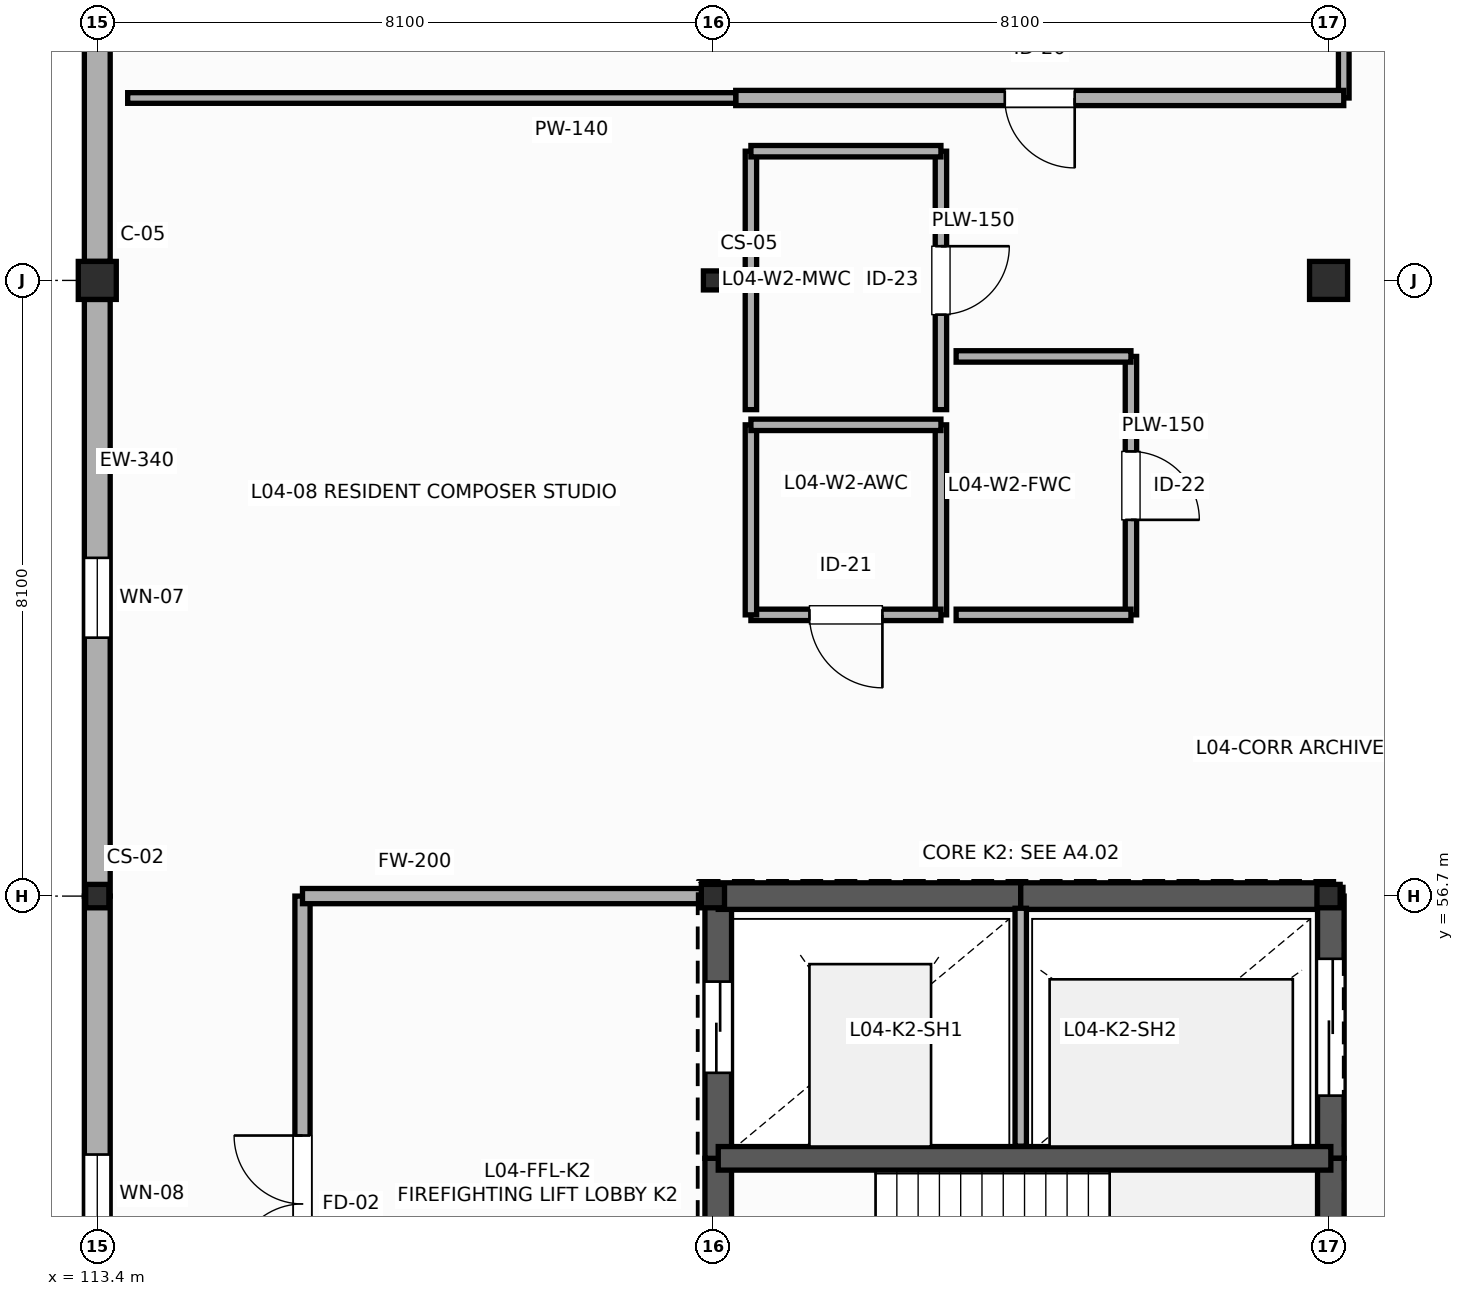
"""IFC4 building model, lengths in metres.
Left out: names, types, materials, properties, quantities, classifications, styles, units other than length and angle.
Written with IfcOpenShell. Run it as: python <this file> out.ifc"""

import sys

from ifc_helpers import new_model, si_unit, direction, frame, frame_2d, origin, origin_2d, place, context, subcontext, project, spatial, rectangle, hollow_rectangle, i_section, extrude, element, fill, save


model = new_model("IFC4")
c1 = context("Model", 3, precision=1e-05, world=origin(), true_north=direction((0.0, 1.0)))
c2 = subcontext(c1, "Body", "Model", "MODEL_VIEW")
j1 = project(units=[si_unit("LENGTHUNIT", "METRE"), si_unit("PLANEANGLEUNIT", "RADIAN")], contexts=[c1])
p1 = place(None, origin())
s1 = spatial("IfcSite", under=j1, at=p1, CompositionType="ELEMENT")
p2 = place(p1, origin())
s2 = spatial("IfcBuilding", under=s1, at=p2, CompositionType="ELEMENT")
p3 = place(p2, frame((0.0, 0.0, 19.2)))
s3 = spatial("IfcBuildingStorey", under=s2, at=p3, CompositionType="ELEMENT", Elevation=19.2)
p4 = place(p3, frame((113.4, 56.7, 0.0), z_axis=(0.0, 0.0, 1.0), x_axis=(1.0, 0.0, 0.0)))
e1 = element("IfcColumn", 1, at=p4, inside=s3, PredefinedType="COLUMN", context=c2, shape_type="SweptSolid", body=[
    extrude(i_section(OverallWidth=0.305, OverallDepth=0.308, WebThickness=0.01, FlangeThickness=0.015, FilletRadius=0.015, at=origin_2d()), origin(), (0.0, 0.0, 1.0), 4.2),
])
p5 = place(p3, frame((113.4, 64.8, 0.0), z_axis=(0.0, 0.0, 1.0), x_axis=(1.0, 0.0, 0.0)))
e2 = element("IfcColumn", 2, at=p5, inside=s3, PredefinedType="COLUMN", context=c2, shape_type="SweptSolid", body=[
    extrude(rectangle(XDim=0.5, YDim=0.5, at=origin_2d()), origin(), (0.0, 0.0, 1.0), 4.2),
])
p6 = place(p3, frame((121.5, 56.7, 0.0), z_axis=(0.0, 0.0, 1.0), x_axis=(1.0, 0.0, 0.0)))
e3 = element("IfcColumn", 3, at=p6, inside=s3, PredefinedType="COLUMN", context=c2, shape_type="SweptSolid", body=[
    extrude(i_section(OverallWidth=0.305, OverallDepth=0.308, WebThickness=0.01, FlangeThickness=0.015, FilletRadius=0.015, at=origin_2d()), origin(), (0.0, 0.0, 1.0), 4.2),
])
p7 = place(p3, frame((121.5, 64.8, 0.0), z_axis=(0.0, 0.0, 1.0), x_axis=(1.0, 0.0, 0.0)))
e4 = element("IfcColumn", 4, at=p7, inside=s3, PredefinedType="COLUMN", context=c2, shape_type="SweptSolid", body=[
    extrude(hollow_rectangle(XDim=0.25, YDim=0.25, WallThickness=0.012, InnerFilletRadius=0.012, OuterFilletRadius=0.025, at=origin_2d()), origin(), (0.0, 0.0, 1.0), 4.2),
])
p8 = place(p3, frame((129.6, 56.7, 0.0), z_axis=(0.0, 0.0, 1.0), x_axis=(1.0, 0.0, 0.0)))
e5 = element("IfcColumn", 5, at=p8, inside=s3, PredefinedType="COLUMN", context=c2, shape_type="SweptSolid", body=[
    extrude(i_section(OverallWidth=0.305, OverallDepth=0.308, WebThickness=0.01, FlangeThickness=0.015, FilletRadius=0.015, at=origin_2d()), origin(), (0.0, 0.0, 1.0), 4.2),
])
p9 = place(p3, frame((129.6, 64.8, 0.0), z_axis=(0.0, 0.0, 1.0), x_axis=(1.0, 0.0, 0.0)))
e6 = element("IfcColumn", 6, at=p9, inside=s3, PredefinedType="COLUMN", context=c2, shape_type="SweptSolid", body=[
    extrude(rectangle(XDim=0.5, YDim=0.5, at=origin_2d()), origin(), (0.0, 0.0, 1.0), 4.2),
])
p10 = place(p3, frame((113.4, 72.65, 0.0), z_axis=(0.0, 0.0, 1.0), x_axis=(0.0, -1.0, 0.0)))
e7 = element("IfcWall", 7, at=p10, inside=s3, PredefinedType="SOLIDWALL", context=c2, shape_type="SweptSolid", body=[
    extrude(rectangle(XDim=7.6, YDim=0.34, at=frame_2d((3.8, 0.0))), origin(), (0.0, 0.0, 1.0), 3.597),
])
p11 = place(p10, frame((3.325, 0.0, 0.9)))
e8 = element("IfcOpeningElement", 8, at=p11, cuts=e7, PredefinedType="OPENING", context=c2, shape_type="SweptSolid", body=[
    extrude(rectangle(XDim=0.95, YDim=1.85, at=frame_2d((0.475, 0.925))), frame((0.0, 0.18, 0.0), z_axis=(0.0, -1.0, 0.0), x_axis=(1.0, 0.0, 0.0)), (0.0, 0.0, 1.0), 0.36),
])
p12 = place(p3, frame((113.4, 64.55, 0.0), z_axis=(0.0, 0.0, 1.0), x_axis=(0.0, -1.0, 0.0)))
e9 = element("IfcWall", 9, at=p12, inside=s3, PredefinedType="SOLIDWALL", context=c2, shape_type="SweptSolid", body=[
    extrude(rectangle(XDim=7.85, YDim=0.34, at=frame_2d((3.925, 0.0))), origin(), (0.0, 0.0, 1.0), 3.597),
])
p13 = place(p12, frame((3.4, 0.0, 0.9)))
e10 = element("IfcOpeningElement", 10, at=p13, cuts=e9, PredefinedType="OPENING", context=c2, shape_type="SweptSolid", body=[
    extrude(rectangle(XDim=1.05, YDim=1.35, at=frame_2d((0.525, 0.675))), frame((0.0, 0.18, 0.0), z_axis=(0.0, -1.0, 0.0), x_axis=(1.0, 0.0, 0.0)), (0.0, 0.0, 1.0), 0.36),
])
p14 = place(p3, frame((113.4, 56.7, 0.0), z_axis=(0.0, 0.0, 1.0), x_axis=(0.0, -1.0, 0.0)))
e11 = element("IfcWall", 11, at=p14, inside=s3, PredefinedType="SOLIDWALL", context=c2, shape_type="SweptSolid", body=[
    extrude(rectangle(XDim=7.85, YDim=0.34, at=frame_2d((3.925, 0.0))), origin(), (0.0, 0.0, 1.0), 3.597),
])
p15 = place(p14, frame((3.4, 0.0, 0.9)))
e12 = element("IfcOpeningElement", 12, at=p15, cuts=e11, PredefinedType="OPENING", context=c2, shape_type="SweptSolid", body=[
    extrude(rectangle(XDim=1.05, YDim=1.65, at=frame_2d((0.525, 0.825))), frame((0.0, 0.18, 0.0), z_axis=(0.0, -1.0, 0.0), x_axis=(1.0, 0.0, 0.0)), (0.0, 0.0, 1.0), 0.36),
])
p16 = place(p3, frame((121.57, 48.83, 0.0), z_axis=(0.0, 0.0, 1.0), x_axis=(0.0, 1.0, 0.0)))
e13 = element("IfcWall", 13, at=p16, inside=s3, PredefinedType="SHEAR", context=c2, shape_type="SweptSolid", body=[
    extrude(rectangle(XDim=4.42, YDim=0.35, at=frame_2d((2.21, 0.0))), origin(), (0.0, 0.0, 1.0), 4.2),
])
p17 = place(p16, frame((1.35, 0.0, 0.0)))
e14 = element("IfcOpeningElement", 14, at=p17, cuts=e13, PredefinedType="OPENING", context=c2, shape_type="SweptSolid", body=[
    extrude(rectangle(XDim=1.2, YDim=2.25, at=frame_2d((0.6, 1.125))), frame((0.0, 0.185, 0.0), z_axis=(0.0, -1.0, 0.0), x_axis=(1.0, 0.0, 0.0)), (0.0, 0.0, 1.0), 0.37),
])
p18 = place(p3, frame((121.57, 53.25, 0.0), z_axis=(0.0, 0.0, 1.0), x_axis=(0.0, 1.0, 0.0)))
e15 = element("IfcWall", 15, at=p18, inside=s3, PredefinedType="SHEAR", context=c2, shape_type="SweptSolid", body=[
    extrude(rectangle(XDim=3.45, YDim=0.35, at=frame_2d((1.725, 0.0))), origin(), (0.0, 0.0, 1.0), 4.2),
])
p19 = place(p18, frame((1.125, 0.0, 0.0)))
e16 = element("IfcOpeningElement", 16, at=p19, cuts=e15, PredefinedType="OPENING", context=c2, shape_type="SweptSolid", body=[
    extrude(rectangle(XDim=1.2, YDim=2.2, at=frame_2d((0.6, 1.1))), frame((0.0, 0.185, 0.0), z_axis=(0.0, -1.0, 0.0), x_axis=(1.0, 0.0, 0.0)), (0.0, 0.0, 1.0), 0.37),
])
p20 = place(p3, frame((121.57, 56.7, 0.0), z_axis=(0.0, 0.0, 1.0), x_axis=(1.0, 0.0, 0.0)))
e17 = element("IfcWall", 17, at=p20, inside=s3, PredefinedType="SHEAR", context=c2, shape_type="SweptSolid", body=[
    extrude(rectangle(XDim=3.98, YDim=0.35, at=frame_2d((1.99, 0.0))), origin(), (0.0, 0.0, 1.0), 4.2),
])
p21 = place(p3, frame((125.55, 56.7, 0.0), z_axis=(0.0, 0.0, 1.0), x_axis=(1.0, 0.0, 0.0)))
e18 = element("IfcWall", 18, at=p21, inside=s3, PredefinedType="SHEAR", context=c2, shape_type="SweptSolid", body=[
    extrude(rectangle(XDim=4.08, YDim=0.35, at=frame_2d((2.04, 0.0))), origin(), (0.0, 0.0, 1.0), 4.2),
])
p22 = place(p3, frame((129.63, 56.7, 0.0), z_axis=(0.0, 0.0, 1.0), x_axis=(0.0, -1.0, 0.0)))
e19 = element("IfcWall", 19, at=p22, inside=s3, PredefinedType="SHEAR", context=c2, shape_type="SweptSolid", body=[
    extrude(rectangle(XDim=3.45, YDim=0.35, at=frame_2d((1.725, 0.0))), origin(), (0.0, 0.0, 1.0), 4.2),
])
p23 = place(p22, frame((0.825, 0.0, 0.0)))
e20 = element("IfcOpeningElement", 20, at=p23, cuts=e19, PredefinedType="OPENING", context=c2, shape_type="SweptSolid", body=[
    extrude(rectangle(XDim=1.8, YDim=2.4, at=frame_2d((0.9, 1.2))), frame((0.0, 0.185, 0.0), z_axis=(0.0, -1.0, 0.0), x_axis=(1.0, 0.0, 0.0)), (0.0, 0.0, 1.0), 0.37),
])
p24 = place(p3, frame((129.63, 53.25, 0.0), z_axis=(0.0, 0.0, 1.0), x_axis=(0.0, -1.0, 0.0)))
e21 = element("IfcWall", 21, at=p24, inside=s3, PredefinedType="SHEAR", context=c2, shape_type="SweptSolid", body=[
    extrude(rectangle(XDim=4.42, YDim=0.35, at=frame_2d((2.21, 0.0))), origin(), (0.0, 0.0, 1.0), 4.2),
])
p25 = place(p3, frame((121.57, 53.25, 0.0), z_axis=(0.0, 0.0, 1.0), x_axis=(1.0, 0.0, 0.0)))
e22 = element("IfcWall", 22, at=p25, inside=s3, PredefinedType="SHEAR", context=c2, shape_type="SweptSolid", body=[
    extrude(rectangle(XDim=8.06, YDim=0.31, at=frame_2d((4.03, 0.0))), origin(), (0.0, 0.0, 1.0), 4.2),
])
p26 = place(p3, frame((125.55, 53.41, 0.0), z_axis=(0.0, 0.0, 1.0), x_axis=(0.0, 1.0, 0.0)))
e23 = element("IfcWall", 23, at=p26, inside=s3, PredefinedType="PLUMBINGWALL", context=c2, shape_type="SweptSolid", body=[
    extrude(rectangle(XDim=3.13, YDim=0.15, at=frame_2d((1.565, 0.0))), origin(), (0.0, 0.0, 1.0), 3.85),
])
p27 = place(p3, frame((116.1, 48.6, 0.0), z_axis=(0.0, 0.0, 1.0), x_axis=(0.0, 1.0, 0.0)))
e24 = element("IfcWall", 24, at=p27, inside=s3, PredefinedType="PARTITIONING", context=c2, shape_type="SweptSolid", body=[
    extrude(rectangle(XDim=8.1, YDim=0.2, at=frame_2d((4.05, 0.0))), origin(), (0.0, 0.0, 1.0), 3.9),
])
p28 = place(p27, frame((3.15, 0.0, 0.0)))
e25 = element("IfcOpeningElement", 25, at=p28, cuts=e24, PredefinedType="OPENING", context=c2, shape_type="SweptSolid", body=[
    extrude(rectangle(XDim=1.8, YDim=2.25, at=frame_2d((0.9, 1.125))), frame((0.0, 0.11, 0.0), z_axis=(0.0, -1.0, 0.0), x_axis=(1.0, 0.0, 0.0)), (0.0, 0.0, 1.0), 0.22),
])
p29 = place(p3, frame((116.1, 56.7, 0.0), z_axis=(0.0, 0.0, 1.0), x_axis=(1.0, 0.0, 0.0)))
e26 = element("IfcWall", 26, at=p29, inside=s3, PredefinedType="PARTITIONING", context=c2, shape_type="SweptSolid", body=[
    extrude(rectangle(XDim=5.47, YDim=0.2, at=frame_2d((2.735, 0.0))), origin(), (0.0, 0.0, 1.0), 3.346),
])
p30 = place(p3, frame((124.5, 62.9, 0.0), z_axis=(0.0, 0.0, 1.0), x_axis=(0.0, -1.0, 0.0)))
e27 = element("IfcWall", 27, at=p30, inside=s3, PredefinedType="PLUMBINGWALL", context=c2, shape_type="SweptSolid", body=[
    extrude(rectangle(XDim=2.5, YDim=0.15, at=frame_2d((1.25, 0.0))), origin(), (0.0, 0.0, 1.0), 3.92),
])
p31 = place(p3, frame((124.5, 60.4, 0.0), z_axis=(0.0, 0.0, 1.0), x_axis=(-1.0, 0.0, 0.0)))
e28 = element("IfcWall", 28, at=p31, inside=s3, PredefinedType="PLUMBINGWALL", context=c2, shape_type="SweptSolid", body=[
    extrude(rectangle(XDim=2.5, YDim=0.15, at=frame_2d((1.25, 0.0))), origin(), (0.0, 0.0, 1.0), 3.92),
])
p32 = place(p31, frame((0.77, 0.0, 0.0)))
e29 = element("IfcOpeningElement", 29, at=p32, cuts=e28, PredefinedType="OPENING", context=c2, shape_type="SweptSolid", body=[
    extrude(rectangle(XDim=0.96, YDim=2.16, at=frame_2d((0.48, 1.08))), frame((0.0, 0.085, 0.0), z_axis=(0.0, -1.0, 0.0), x_axis=(1.0, 0.0, 0.0)), (0.0, 0.0, 1.0), 0.17),
])
for number, where, z_axis, x_axis in (
    (30, (122.0, 60.4, 0.0), (0.0, 0.0, 1.0), (0.0, 1.0, 0.0)),
    (31, (122.0, 62.9, 0.0), (0.0, 0.0, 1.0), (1.0, 0.0, 0.0)),
):
    element("IfcWall", number, at=place(p3, frame(where, z_axis=z_axis, x_axis=x_axis)), inside=s3, PredefinedType="PLUMBINGWALL", context=c2, shape_type="SweptSolid", body=[
        extrude(rectangle(XDim=2.5, YDim=0.15, at=frame_2d((1.25, 0.0))), origin(), (0.0, 0.0, 1.0), 3.92),
    ])
p33 = place(p3, frame((127.0, 63.8, 0.0), z_axis=(0.0, 0.0, 1.0), x_axis=(0.0, -1.0, 0.0)))
e32 = element("IfcWall", 32, at=p33, inside=s3, PredefinedType="PLUMBINGWALL", context=c2, shape_type="SweptSolid", body=[
    extrude(rectangle(XDim=3.4, YDim=0.15, at=frame_2d((1.7, 0.0))), origin(), (0.0, 0.0, 1.0), 3.92),
])
p34 = place(p33, frame((1.25, 0.0, 0.0)))
e33 = element("IfcOpeningElement", 33, at=p34, cuts=e32, PredefinedType="OPENING", context=c2, shape_type="SweptSolid", body=[
    extrude(rectangle(XDim=0.9, YDim=2.1, at=frame_2d((0.45, 1.05))), frame((0.0, 0.085, 0.0), z_axis=(0.0, -1.0, 0.0), x_axis=(1.0, 0.0, 0.0)), (0.0, 0.0, 1.0), 0.17),
])
for number, where, z_axis, x_axis in (
    (34, (127.0, 60.4, 0.0), (0.0, 0.0, 1.0), (-1.0, 0.0, 0.0)),
    (35, (124.7, 63.8, 0.0), (0.0, 0.0, 1.0), (1.0, 0.0, 0.0)),
):
    element("IfcWall", number, at=place(p3, frame(where, z_axis=z_axis, x_axis=x_axis)), inside=s3, PredefinedType="PLUMBINGWALL", context=c2, shape_type="SweptSolid", body=[
        extrude(rectangle(XDim=2.3, YDim=0.15, at=frame_2d((1.15, 0.0))), origin(), (0.0, 0.0, 1.0), 3.92),
    ])
p35 = place(p3, frame((124.5, 66.5, 0.0), z_axis=(0.0, 0.0, 1.0), x_axis=(0.0, -1.0, 0.0)))
e36 = element("IfcWall", 36, at=p35, inside=s3, PredefinedType="PLUMBINGWALL", context=c2, shape_type="SweptSolid", body=[
    extrude(rectangle(XDim=3.4, YDim=0.15, at=frame_2d((1.7, 0.0))), origin(), (0.0, 0.0, 1.0), 3.92),
])
p36 = place(p35, frame((1.25, 0.0, 0.0)))
e37 = element("IfcOpeningElement", 37, at=p36, cuts=e36, PredefinedType="OPENING", context=c2, shape_type="SweptSolid", body=[
    extrude(rectangle(XDim=0.9, YDim=2.2, at=frame_2d((0.45, 1.1))), frame((0.0, 0.085, 0.0), z_axis=(0.0, -1.0, 0.0), x_axis=(1.0, 0.0, 0.0)), (0.0, 0.0, 1.0), 0.17),
])
p37 = place(p3, frame((122.0, 63.1, 0.0), z_axis=(0.0, 0.0, 1.0), x_axis=(0.0, 1.0, 0.0)))
e38 = element("IfcWall", 38, at=p37, inside=s3, PredefinedType="PLUMBINGWALL", context=c2, shape_type="SweptSolid", body=[
    extrude(rectangle(XDim=3.4, YDim=0.15, at=frame_2d((1.7, 0.0))), origin(), (0.0, 0.0, 1.0), 3.92),
])
p38 = place(p3, frame((122.0, 66.5, 0.0), z_axis=(0.0, 0.0, 1.0), x_axis=(1.0, 0.0, 0.0)))
e39 = element("IfcWall", 39, at=p38, inside=s3, PredefinedType="PLUMBINGWALL", context=c2, shape_type="SweptSolid", body=[
    extrude(rectangle(XDim=2.5, YDim=0.15, at=frame_2d((1.25, 0.0))), origin(), (0.0, 0.0, 1.0), 3.92),
])
p39 = place(p3, frame((129.8, 74.367, 0.0), z_axis=(0.0, 0.0, 1.0), x_axis=(0.0, -1.0, 0.0)))
e40 = element("IfcWall", 40, at=p39, inside=s3, PredefinedType="PARTITIONING", context=c2, shape_type="SweptSolid", body=[
    extrude(rectangle(XDim=7.167, YDim=0.14, at=frame_2d((3.583, 0.0))), origin(), (0.0, 0.0, 1.0), 3.254),
])
p40 = place(p3, frame((129.8, 67.2, 0.0), z_axis=(0.0, 0.0, 1.0), x_axis=(-1.0, 0.0, 0.0)))
e41 = element("IfcWall", 41, at=p40, inside=s3, PredefinedType="PARTITIONING", context=c2, shape_type="SweptSolid", body=[
    extrude(rectangle(XDim=8.0, YDim=0.2, at=frame_2d((4.0, 0.0))), origin(), (0.0, 0.0, 1.0), 3.92),
])
p41 = place(p40, frame((3.54, 0.0, 0.0)))
e42 = element("IfcOpeningElement", 42, at=p41, cuts=e41, PredefinedType="OPENING", context=c2, shape_type="SweptSolid", body=[
    extrude(rectangle(XDim=0.92, YDim=2.1, at=frame_2d((0.46, 1.05))), frame((0.0, 0.11, 0.0), z_axis=(0.0, -1.0, 0.0), x_axis=(1.0, 0.0, 0.0)), (0.0, 0.0, 1.0), 0.22),
])
p42 = place(p3, frame((121.8, 67.2, 0.0), z_axis=(0.0, 0.0, 1.0), x_axis=(-1.0, 0.0, 0.0)))
e43 = element("IfcWall", 43, at=p42, inside=s3, PredefinedType="PARTITIONING", context=c2, shape_type="SweptSolid", body=[
    extrude(rectangle(XDim=8.0, YDim=0.14, at=frame_2d((4.0, 0.0))), origin(), (0.0, 0.0, 1.0), 3.92),
])
p43 = place(p13, origin())
e44 = element("IfcWindow", 44, at=p43, inside=s3, PartitioningType="SINGLE_PANEL", PredefinedType="WINDOW", context=c2, shape_type="SweptSolid", body=[
    extrude(rectangle(XDim=1.05, YDim=1.35, at=frame_2d((0.525, 0.675))), frame((0.0, 0.03, 0.0), z_axis=(0.0, -1.0, 0.0), x_axis=(1.0, 0.0, 0.0)), (0.0, 0.0, 1.0), 0.06),
])
fill(e10, e44)
p44 = place(p15, origin())
e45 = element("IfcWindow", 45, at=p44, inside=s3, PartitioningType="SINGLE_PANEL", PredefinedType="WINDOW", context=c2, shape_type="SweptSolid", body=[
    extrude(rectangle(XDim=1.05, YDim=1.65, at=frame_2d((0.525, 0.825))), frame((0.0, 0.03, 0.0), z_axis=(0.0, -1.0, 0.0), x_axis=(1.0, 0.0, 0.0)), (0.0, 0.0, 1.0), 0.06),
])
fill(e12, e45)
p45 = place(p19, origin())
e46 = element("IfcDoor", 46, at=p45, inside=s3, OperationType="SLIDING_TO_LEFT", PredefinedType="DOOR", context=c2, shape_type="SweptSolid", body=[
    extrude(rectangle(XDim=1.2, YDim=2.2, at=frame_2d((0.6, 1.1))), frame((0.0, 0.025, 0.0), z_axis=(0.0, -1.0, 0.0), x_axis=(1.0, 0.0, 0.0)), (0.0, 0.0, 1.0), 0.05),
])
fill(e16, e46)
p46 = place(p23, origin())
e47 = element("IfcDoor", 47, at=p46, inside=s3, OperationType="SLIDING_TO_LEFT", PredefinedType="DOOR", context=c2, shape_type="SweptSolid", body=[
    extrude(rectangle(XDim=1.8, YDim=2.4, at=frame_2d((0.9, 1.2))), frame((0.0, 0.025, 0.0), z_axis=(0.0, -1.0, 0.0), x_axis=(1.0, 0.0, 0.0)), (0.0, 0.0, 1.0), 0.05),
])
fill(e20, e47)
p47 = place(p28, origin())
e48 = element("IfcDoor", 48, at=p47, inside=s3, OperationType="DOUBLE_DOOR_SINGLE_SWING", PredefinedType="DOOR", context=c2, shape_type="SweptSolid", body=[
    extrude(rectangle(XDim=1.8, YDim=2.25, at=frame_2d((0.9, 1.125))), frame((0.0, 0.025, 0.0), z_axis=(0.0, -1.0, 0.0), x_axis=(1.0, 0.0, 0.0)), (0.0, 0.0, 1.0), 0.05),
])
fill(e25, e48)
p48 = place(p32, origin())
e49 = element("IfcDoor", 49, at=p48, inside=s3, OperationType="SINGLE_SWING_LEFT", PredefinedType="DOOR", context=c2, shape_type="SweptSolid", body=[
    extrude(rectangle(XDim=0.96, YDim=2.16, at=frame_2d((0.48, 1.08))), frame((0.0, 0.025, 0.0), z_axis=(0.0, -1.0, 0.0), x_axis=(1.0, 0.0, 0.0)), (0.0, 0.0, 1.0), 0.05),
])
fill(e29, e49)
p49 = place(p34, origin())
e50 = element("IfcDoor", 50, at=p49, inside=s3, OperationType="SINGLE_SWING_RIGHT", PredefinedType="DOOR", context=c2, shape_type="SweptSolid", body=[
    extrude(rectangle(XDim=0.9, YDim=2.1, at=frame_2d((0.45, 1.05))), frame((0.0, 0.025, 0.0), z_axis=(0.0, -1.0, 0.0), x_axis=(1.0, 0.0, 0.0)), (0.0, 0.0, 1.0), 0.05),
])
fill(e33, e50)
p50 = place(p36, origin())
e51 = element("IfcDoor", 51, at=p50, inside=s3, OperationType="SINGLE_SWING_LEFT", PredefinedType="DOOR", context=c2, shape_type="SweptSolid", body=[
    extrude(rectangle(XDim=0.9, YDim=2.2, at=frame_2d((0.45, 1.1))), frame((0.0, 0.025, 0.0), z_axis=(0.0, -1.0, 0.0), x_axis=(1.0, 0.0, 0.0)), (0.0, 0.0, 1.0), 0.05),
])
fill(e37, e51)
p51 = place(p41, origin())
e52 = element("IfcDoor", 52, at=p51, inside=s3, OperationType="SINGLE_SWING_LEFT", PredefinedType="DOOR", context=c2, shape_type="SweptSolid", body=[
    extrude(rectangle(XDim=0.92, YDim=2.1, at=frame_2d((0.46, 1.05))), frame((0.0, 0.025, 0.0), z_axis=(0.0, -1.0, 0.0), x_axis=(1.0, 0.0, 0.0)), (0.0, 0.0, 1.0), 0.05),
])
fill(e42, e52)
save(model, sys.argv[1])
